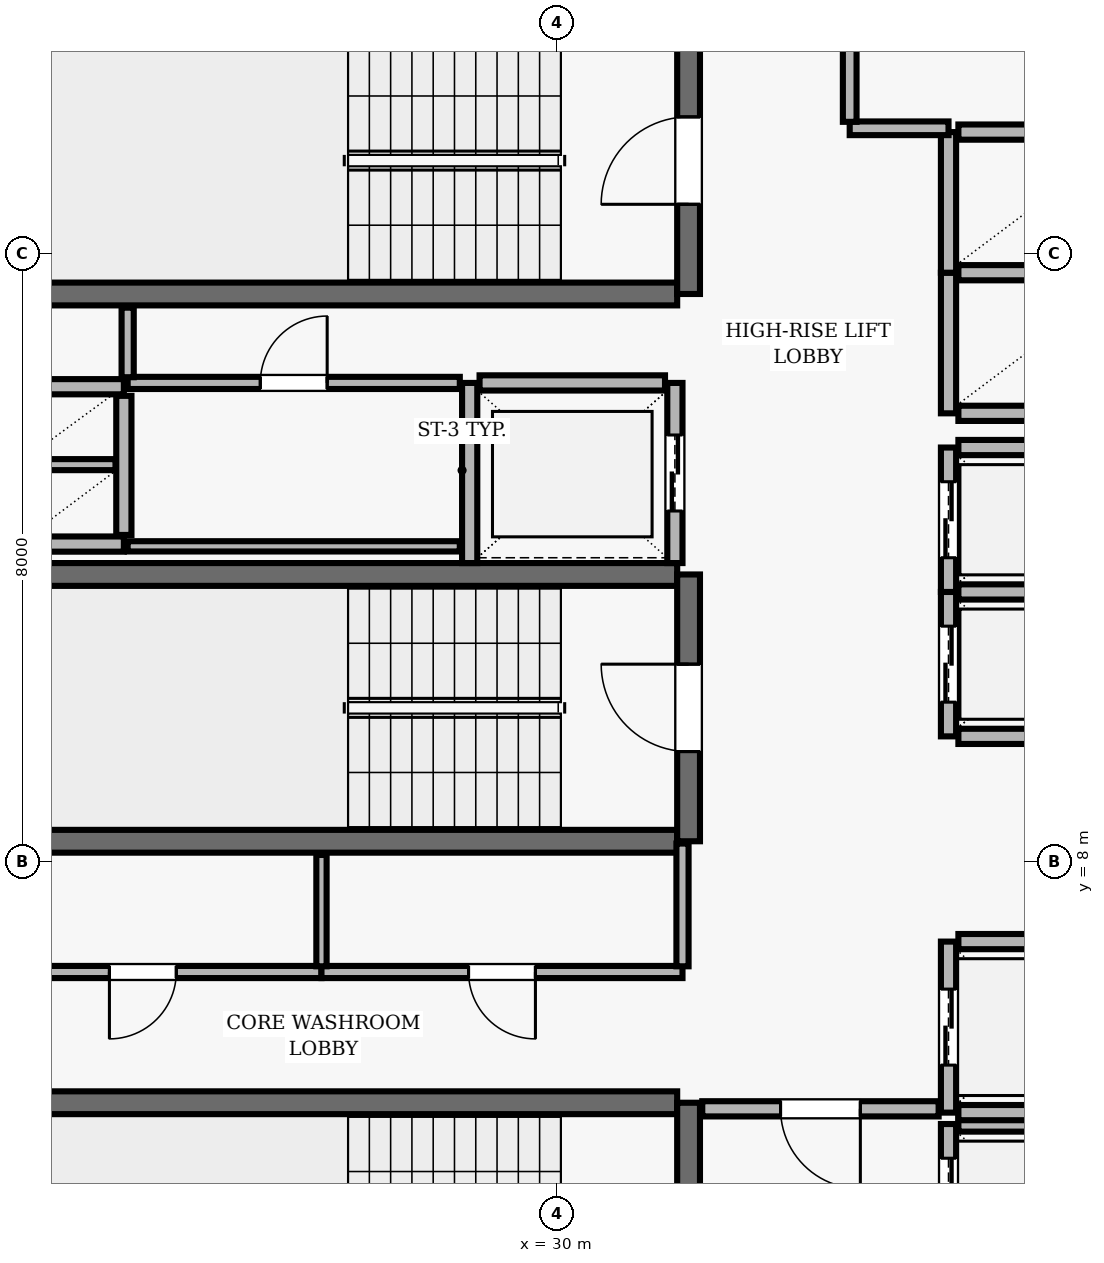
"""IFC4 building model, lengths in metres.
Left out: names, types, materials, properties, quantities, classifications, styles, units other than length and angle.
Written with IfcOpenShell. Run it as: python <this file> out.ifc"""

import sys

from ifc_helpers import new_model, si_unit, direction, frame, frame_2d, origin, place, context, subcontext, project, spatial, rectangle, extrude, element, fill, save


model = new_model("IFC4")
c1 = context("Model", 3, precision=1e-05, world=origin(), true_north=direction((0.0, 1.0)))
c2 = subcontext(c1, "Body", "Model", "MODEL_VIEW")
j1 = project(units=[si_unit("LENGTHUNIT", "METRE"), si_unit("PLANEANGLEUNIT", "RADIAN")], contexts=[c1])
p1 = place(None, origin())
s1 = spatial("IfcSite", under=j1, at=p1, CompositionType="ELEMENT")
p2 = place(p1, origin())
s2 = spatial("IfcBuilding", under=s1, at=p2, CompositionType="ELEMENT")
p3 = place(p2, frame((0.0, 0.0, 287.2)))
s3 = spatial("IfcBuildingStorey", under=s2, at=p3, CompositionType="ELEMENT", Elevation=287.2)
p4 = place(p3, frame((31.58, 4.83, 0.0), z_axis=(0.0, 0.0, 1.0), x_axis=(-1.0, 0.0, 0.0)))
e1 = element("IfcWall", 1, at=p4, inside=s3, PredefinedType="SHEAR", context=c2, shape_type="SweptSolid", body=[
    extrude(rectangle(XDim=8.36, YDim=0.3, at=frame_2d((4.18, 0.0))), origin(), (0.0, 0.0, 1.0), 3.69),
])
p5 = place(p3, frame((31.73, 0.96, 0.0), z_axis=(0.0, 0.0, 1.0), x_axis=(0.0, 1.0, 0.0)))
e2 = element("IfcWall", 2, at=p5, inside=s3, PredefinedType="SHEAR", context=c2, shape_type="SweptSolid", body=[
    extrude(rectangle(XDim=3.87, YDim=0.3, at=frame_2d((1.935, 0.0))), origin(), (0.0, 0.0, 1.0), 3.69),
])
p6 = place(p5, frame((1.54, 0.0, 0.0)))
e3 = element("IfcOpeningElement", 3, at=p6, cuts=e2, PredefinedType="OPENING", context=c2, shape_type="SweptSolid", body=[
    extrude(rectangle(XDim=1.15, YDim=2.15, at=frame_2d((0.575, 1.075))), frame((0.0, 0.16, 0.0), z_axis=(0.0, -1.0, 0.0), x_axis=(1.0, 0.0, 0.0)), (0.0, 0.0, 1.0), 0.32),
])
p7 = place(p3, frame((23.22, 15.47, 0.0), z_axis=(0.0, 0.0, 1.0), x_axis=(1.0, 0.0, 0.0)))
e4 = element("IfcWall", 4, at=p7, inside=s3, PredefinedType="SHEAR", context=c2, shape_type="SweptSolid", body=[
    extrude(rectangle(XDim=8.36, YDim=0.3, at=frame_2d((4.18, 0.0))), origin(), (0.0, 0.0, 1.0), 3.69),
])
p8 = place(p3, frame((31.73, 15.47, 0.0), z_axis=(0.0, 0.0, 1.0), x_axis=(0.0, 1.0, 0.0)))
e5 = element("IfcWall", 5, at=p8, inside=s3, PredefinedType="SHEAR", context=c2, shape_type="SweptSolid", body=[
    extrude(rectangle(XDim=3.51, YDim=0.3, at=frame_2d((1.755, 0.0))), origin(), (0.0, 0.0, 1.0), 3.69),
])
p9 = place(p8, frame((1.18, 0.0, 0.0)))
e6 = element("IfcOpeningElement", 6, at=p9, cuts=e5, PredefinedType="OPENING", context=c2, shape_type="SweptSolid", body=[
    extrude(rectangle(XDim=1.15, YDim=2.15, at=frame_2d((0.575, 1.075))), frame((0.0, 0.16, 0.0), z_axis=(0.0, -1.0, 0.0), x_axis=(1.0, 0.0, 0.0)), (0.0, 0.0, 1.0), 0.32),
])
for number, where, z_axis, x_axis in (
    (7, (31.58, 11.78, 0.0), (0.0, 0.0, 1.0), (-1.0, 0.0, 0.0)),
    (8, (23.22, 8.27, 0.0), (0.0, 0.0, 1.0), (1.0, 0.0, 0.0)),
):
    element("IfcWall", number, at=place(p3, frame(where, z_axis=z_axis, x_axis=x_axis)), inside=s3, PredefinedType="SHEAR", context=c2, shape_type="SweptSolid", body=[
        extrude(rectangle(XDim=8.36, YDim=0.3, at=frame_2d((4.18, 0.0))), origin(), (0.0, 0.0, 1.0), 3.69),
    ])
p10 = place(p3, frame((31.73, 8.27, 0.0), z_axis=(0.0, 0.0, 1.0), x_axis=(0.0, 1.0, 0.0)))
e9 = element("IfcWall", 9, at=p10, inside=s3, PredefinedType="SHEAR", context=c2, shape_type="SweptSolid", body=[
    extrude(rectangle(XDim=3.51, YDim=0.3, at=frame_2d((1.755, 0.0))), origin(), (0.0, 0.0, 1.0), 3.69),
])
p11 = place(p10, frame((1.18, 0.0, 0.0)))
e10 = element("IfcOpeningElement", 10, at=p11, cuts=e9, PredefinedType="OPENING", context=c2, shape_type="SweptSolid", body=[
    extrude(rectangle(XDim=1.15, YDim=2.15, at=frame_2d((0.575, 1.075))), frame((0.0, 0.16, 0.0), z_axis=(0.0, -1.0, 0.0), x_axis=(1.0, 0.0, 0.0)), (0.0, 0.0, 1.0), 0.32),
])
p12 = place(p3, frame((35.15, 4.55, 0.0), z_axis=(0.0, 0.0, 1.0), x_axis=(0.0, -1.0, 0.0)))
e11 = element("IfcWall", 11, at=p12, inside=s3, PredefinedType="SOLIDWALL", context=c2, shape_type="SweptSolid", body=[
    extrude(rectangle(XDim=2.1, YDim=0.2, at=frame_2d((1.05, 0.0))), origin(), (0.0, 0.0, 1.0), 3.69),
])
p13 = place(p12, frame((0.45, 0.0, 0.0)))
e12 = element("IfcOpeningElement", 12, at=p13, cuts=e11, PredefinedType="OPENING", context=c2, shape_type="SweptSolid", body=[
    extrude(rectangle(XDim=1.2, YDim=2.15, at=frame_2d((0.6, 1.075))), frame((0.0, 0.11, 0.0), z_axis=(0.0, -1.0, 0.0), x_axis=(1.0, 0.0, 0.0)), (0.0, 0.0, 1.0), 0.22),
])
p14 = place(p3, frame((37.42, 4.55, 0.0), z_axis=(0.0, 0.0, 1.0), x_axis=(-1.0, 0.0, 0.0)))
e13 = element("IfcWall", 13, at=p14, inside=s3, PredefinedType="SOLIDWALL", context=c2, shape_type="SweptSolid", body=[
    extrude(rectangle(XDim=2.14, YDim=0.2, at=frame_2d((1.07, 0.0))), origin(), (0.0, 0.0, 1.0), 3.69),
])
p15 = place(p3, frame((35.15, 6.95, 0.0), z_axis=(0.0, 0.0, 1.0), x_axis=(0.0, -1.0, 0.0)))
e14 = element("IfcWall", 14, at=p15, inside=s3, PredefinedType="SOLIDWALL", context=c2, shape_type="SweptSolid", body=[
    extrude(rectangle(XDim=2.25, YDim=0.2, at=frame_2d((1.125, 0.0))), origin(), (0.0, 0.0, 1.0), 3.69),
])
p16 = place(p15, frame((0.625, 0.0, 0.0)))
e15 = element("IfcOpeningElement", 15, at=p16, cuts=e14, PredefinedType="OPENING", context=c2, shape_type="SweptSolid", body=[
    extrude(rectangle(XDim=1.0, YDim=2.1, at=frame_2d((0.5, 1.05))), frame((0.0, 0.11, 0.0), z_axis=(0.0, -1.0, 0.0), x_axis=(1.0, 0.0, 0.0)), (0.0, 0.0, 1.0), 0.22),
])
for number, where, z_axis, x_axis in (
    (16, (35.28, 4.7, 0.0), (0.0, 0.0, 1.0), (1.0, 0.0, 0.0)),
    (17, (37.42, 6.95, 0.0), (0.0, 0.0, 1.0), (-1.0, 0.0, 0.0)),
):
    element("IfcWall", number, at=place(p3, frame(where, z_axis=z_axis, x_axis=x_axis)), inside=s3, PredefinedType="SOLIDWALL", context=c2, shape_type="SweptSolid", body=[
        extrude(rectangle(XDim=2.14, YDim=0.2, at=frame_2d((1.07, 0.0))), origin(), (0.0, 0.0, 1.0), 3.69),
    ])
p17 = place(p3, frame((35.15, 11.55, 0.0), z_axis=(0.0, 0.0, 1.0), x_axis=(0.0, -1.0, 0.0)))
e18 = element("IfcWall", 18, at=p17, inside=s3, PredefinedType="SOLIDWALL", context=c2, shape_type="SweptSolid", body=[
    extrude(rectangle(XDim=1.9, YDim=0.2, at=frame_2d((0.95, 0.0))), origin(), (0.0, 0.0, 1.0), 3.69),
])
p18 = place(p17, frame((0.45, 0.0, 0.0)))
e19 = element("IfcOpeningElement", 19, at=p18, cuts=e18, PredefinedType="OPENING", context=c2, shape_type="SweptSolid", body=[
    extrude(rectangle(XDim=1.0, YDim=2.1, at=frame_2d((0.5, 1.05))), frame((0.0, 0.11, 0.0), z_axis=(0.0, -1.0, 0.0), x_axis=(1.0, 0.0, 0.0)), (0.0, 0.0, 1.0), 0.22),
])
for number, where, z_axis, x_axis in (
    (20, (35.28, 9.65, 0.0), (0.0, 0.0, 1.0), (1.0, 0.0, 0.0)),
    (21, (37.42, 11.55, 0.0), (0.0, 0.0, 1.0), (-1.0, 0.0, 0.0)),
):
    element("IfcWall", number, at=place(p3, frame(where, z_axis=z_axis, x_axis=x_axis)), inside=s3, PredefinedType="SOLIDWALL", context=c2, shape_type="SweptSolid", body=[
        extrude(rectangle(XDim=2.14, YDim=0.2, at=frame_2d((1.07, 0.0))), origin(), (0.0, 0.0, 1.0), 3.69),
    ])
p19 = place(p3, frame((35.15, 13.45, 0.0), z_axis=(0.0, 0.0, 1.0), x_axis=(0.0, -1.0, 0.0)))
e22 = element("IfcWall", 22, at=p19, inside=s3, PredefinedType="SOLIDWALL", context=c2, shape_type="SweptSolid", body=[
    extrude(rectangle(XDim=1.9, YDim=0.2, at=frame_2d((0.95, 0.0))), origin(), (0.0, 0.0, 1.0), 3.69),
])
p20 = place(p19, frame((0.45, 0.0, 0.0)))
e23 = element("IfcOpeningElement", 23, at=p20, cuts=e22, PredefinedType="OPENING", context=c2, shape_type="SweptSolid", body=[
    extrude(rectangle(XDim=1.0, YDim=2.1, at=frame_2d((0.5, 1.05))), frame((0.0, 0.11, 0.0), z_axis=(0.0, -1.0, 0.0), x_axis=(1.0, 0.0, 0.0)), (0.0, 0.0, 1.0), 0.22),
])
p21 = place(p3, frame((37.42, 13.45, 0.0), z_axis=(0.0, 0.0, 1.0), x_axis=(-1.0, 0.0, 0.0)))
e24 = element("IfcWall", 24, at=p21, inside=s3, PredefinedType="SOLIDWALL", context=c2, shape_type="SweptSolid", body=[
    extrude(rectangle(XDim=2.14, YDim=0.2, at=frame_2d((1.07, 0.0))), origin(), (0.0, 0.0, 1.0), 3.69),
])
p22 = place(p3, frame((28.85, 14.3, 0.0), z_axis=(0.0, 0.0, 1.0), x_axis=(0.0, -1.0, 0.0)))
e25 = element("IfcWall", 25, at=p22, inside=s3, PredefinedType="SOLIDWALL", context=c2, shape_type="SweptSolid", body=[
    extrude(rectangle(XDim=2.37, YDim=0.2, at=frame_2d((1.185, 0.0))), origin(), (0.0, 0.0, 1.0), 3.69),
])
p23 = place(p3, frame((31.55, 11.93, 0.0), z_axis=(0.0, 0.0, 1.0), x_axis=(0.0, 1.0, 0.0)))
e26 = element("IfcWall", 26, at=p23, inside=s3, PredefinedType="SOLIDWALL", context=c2, shape_type="SweptSolid", body=[
    extrude(rectangle(XDim=2.37, YDim=0.2, at=frame_2d((1.185, 0.0))), origin(), (0.0, 0.0, 1.0), 3.69),
])
p24 = place(p23, frame((0.685, 0.0, 0.0)))
e27 = element("IfcOpeningElement", 27, at=p24, cuts=e26, PredefinedType="OPENING", context=c2, shape_type="SweptSolid", body=[
    extrude(rectangle(XDim=1.0, YDim=2.1, at=frame_2d((0.5, 1.05))), frame((0.0, 0.11, 0.0), z_axis=(0.0, -1.0, 0.0), x_axis=(1.0, 0.0, 0.0)), (0.0, 0.0, 1.0), 0.22),
])
p25 = place(p3, frame((31.42, 14.3, 0.0), z_axis=(0.0, 0.0, 1.0), x_axis=(-1.0, 0.0, 0.0)))
e28 = element("IfcWall", 28, at=p25, inside=s3, PredefinedType="SOLIDWALL", context=c2, shape_type="SweptSolid", body=[
    extrude(rectangle(XDim=2.44, YDim=0.2, at=frame_2d((1.22, 0.0))), origin(), (0.0, 0.0, 1.0), 3.69),
])
p26 = place(p3, frame((35.15, 15.75, 0.0), z_axis=(0.0, 0.0, 1.0), x_axis=(0.0, -1.0, 0.0)))
e29 = element("IfcWall", 29, at=p26, inside=s3, PredefinedType="SOLIDWALL", context=c2, shape_type="SweptSolid", body=[
    extrude(rectangle(XDim=1.85, YDim=0.2, at=frame_2d((0.925, 0.0))), origin(), (0.0, 0.0, 1.0), 3.69),
])
for number, where, z_axis, x_axis in (
    (30, (35.28, 13.9, 0.0), (0.0, 0.0, 1.0), (1.0, 0.0, 0.0)),
    (31, (37.42, 15.75, 0.0), (0.0, 0.0, 1.0), (-1.0, 0.0, 0.0)),
):
    element("IfcWall", number, at=place(p3, frame(where, z_axis=z_axis, x_axis=x_axis)), inside=s3, PredefinedType="SOLIDWALL", context=c2, shape_type="SweptSolid", body=[
        extrude(rectangle(XDim=2.14, YDim=0.2, at=frame_2d((1.07, 0.0))), origin(), (0.0, 0.0, 1.0), 3.69),
    ])
p27 = place(p3, frame((35.15, 17.6, 0.0), z_axis=(0.0, 0.0, 1.0), x_axis=(0.0, -1.0, 0.0)))
e32 = element("IfcWall", 32, at=p27, inside=s3, PredefinedType="SOLIDWALL", context=c2, shape_type="SweptSolid", body=[
    extrude(rectangle(XDim=1.85, YDim=0.2, at=frame_2d((0.925, 0.0))), origin(), (0.0, 0.0, 1.0), 3.69),
])
p28 = place(p3, frame((37.42, 17.6, 0.0), z_axis=(0.0, 0.0, 1.0), x_axis=(-1.0, 0.0, 0.0)))
e33 = element("IfcWall", 33, at=p28, inside=s3, PredefinedType="SOLIDWALL", context=c2, shape_type="SweptSolid", body=[
    extrude(rectangle(XDim=2.14, YDim=0.2, at=frame_2d((1.07, 0.0))), origin(), (0.0, 0.0, 1.0), 3.69),
])
for number, where, z_axis, x_axis in (
    (34, (22.9, 14.25, 0.0), (0.0, 0.0, 1.0), (1.0, 0.0, 0.0)),
    (35, (22.9, 12.18, 0.0), (0.0, 0.0, 1.0), (1.0, 0.0, 0.0)),
):
    element("IfcWall", number, at=place(p3, frame(where, z_axis=z_axis, x_axis=x_axis)), inside=s3, PredefinedType="SOLIDWALL", context=c2, shape_type="SweptSolid", body=[
        extrude(rectangle(XDim=1.4, YDim=0.2, at=frame_2d((0.7, 0.0))), origin(), (0.0, 0.0, 1.0), 3.69),
    ])
p29 = place(p3, frame((24.3, 12.3, 0.0), z_axis=(0.0, 0.0, 1.0), x_axis=(0.0, 1.0, 0.0)))
e36 = element("IfcWall", 36, at=p29, inside=s3, PredefinedType="SOLIDWALL", context=c2, shape_type="SweptSolid", body=[
    extrude(rectangle(XDim=1.83, YDim=0.2, at=frame_2d((0.915, 0.0))), origin(), (0.0, 0.0, 1.0), 3.69),
])
p30 = place(p3, frame((23.01, 13.225, 0.0), z_axis=(0.0, 0.0, 1.0), x_axis=(1.0, 0.0, 0.0)))
e37 = element("IfcWall", 37, at=p30, inside=s3, PredefinedType="PARTITIONING", context=c2, shape_type="SweptSolid", body=[
    extrude(rectangle(XDim=1.18, YDim=0.145, at=frame_2d((0.59, 0.0))), origin(), (0.0, 0.0, 1.0), 3.69),
])
p31 = place(p3, frame((24.35, 12.15, 0.0), z_axis=(0.0, 0.0, 1.0), x_axis=(1.0, 0.0, 0.0)))
e38 = element("IfcWall", 38, at=p31, inside=s3, PredefinedType="PARTITIONING", context=c2, shape_type="SweptSolid", body=[
    extrude(rectangle(XDim=4.37, YDim=0.135, at=frame_2d((2.185, 0.0))), origin(), (0.0, 0.0, 1.0), 3.69),
])
p32 = place(p3, frame((24.35, 14.3, 0.0), z_axis=(0.0, 0.0, 1.0), x_axis=(1.0, 0.0, 0.0)))
e39 = element("IfcWall", 39, at=p32, inside=s3, PredefinedType="PARTITIONING", context=c2, shape_type="SweptSolid", body=[
    extrude(rectangle(XDim=4.37, YDim=0.16, at=frame_2d((2.185, 0.0))), origin(), (0.0, 0.0, 1.0), 3.69),
])
p33 = place(p32, frame((1.745, 0.0, 0.0)))
e40 = element("IfcOpeningElement", 40, at=p33, cuts=e39, PredefinedType="OPENING", context=c2, shape_type="SweptSolid", body=[
    extrude(rectangle(XDim=0.88, YDim=2.1, at=frame_2d((0.44, 1.05))), frame((0.0, 0.09, 0.0), z_axis=(0.0, -1.0, 0.0), x_axis=(1.0, 0.0, 0.0)), (0.0, 0.0, 1.0), 0.18),
])
p34 = place(p3, frame((26.9, 6.55, 0.0), z_axis=(0.0, 0.0, 1.0), x_axis=(-1.0, 0.0, 0.0)))
e41 = element("IfcWall", 41, at=p34, inside=s3, PredefinedType="PARTITIONING", context=c2, shape_type="SweptSolid", body=[
    extrude(rectangle(XDim=4.7, YDim=0.16, at=frame_2d((2.35, 0.0))), origin(), (0.0, 0.0, 1.0), 3.69),
])
p35 = place(p34, frame((1.91, 0.0, 0.0)))
e42 = element("IfcOpeningElement", 42, at=p35, cuts=e41, PredefinedType="OPENING", context=c2, shape_type="SweptSolid", body=[
    extrude(rectangle(XDim=0.88, YDim=2.1, at=frame_2d((0.44, 1.05))), frame((0.0, 0.09, 0.0), z_axis=(0.0, -1.0, 0.0), x_axis=(1.0, 0.0, 0.0)), (0.0, 0.0, 1.0), 0.18),
])
p36 = place(p3, frame((31.65, 6.55, 0.0), z_axis=(0.0, 0.0, 1.0), x_axis=(-1.0, 0.0, 0.0)))
e43 = element("IfcWall", 43, at=p36, inside=s3, PredefinedType="PARTITIONING", context=c2, shape_type="SweptSolid", body=[
    extrude(rectangle(XDim=4.75, YDim=0.16, at=frame_2d((2.375, 0.0))), origin(), (0.0, 0.0, 1.0), 3.69),
])
p37 = place(p36, frame((1.935, 0.0, 0.0)))
e44 = element("IfcOpeningElement", 44, at=p37, cuts=e43, PredefinedType="OPENING", context=c2, shape_type="SweptSolid", body=[
    extrude(rectangle(XDim=0.88, YDim=2.1, at=frame_2d((0.44, 1.05))), frame((0.0, 0.09, 0.0), z_axis=(0.0, -1.0, 0.0), x_axis=(1.0, 0.0, 0.0)), (0.0, 0.0, 1.0), 0.18),
])
p38 = place(p3, frame((33.85, 17.65, 0.0), z_axis=(0.0, 0.0, 1.0), x_axis=(1.0, 0.0, 0.0)))
e45 = element("IfcWall", 45, at=p38, inside=s3, PredefinedType="PARTITIONING", context=c2, shape_type="SweptSolid", body=[
    extrude(rectangle(XDim=1.3, YDim=0.18, at=frame_2d((0.65, 0.0))), origin(), (0.0, 0.0, 1.0), 3.69),
])
p39 = place(p3, frame((35.02, 4.75, 0.0), z_axis=(0.0, 0.0, 1.0), x_axis=(-1.0, 0.0, 0.0)))
e46 = element("IfcWall", 46, at=p39, inside=s3, PredefinedType="SOLIDWALL", context=c2, shape_type="SweptSolid", body=[
    extrude(rectangle(XDim=3.11, YDim=0.2, at=frame_2d((1.555, 0.0))), origin(), (0.0, 0.0, 1.0), 3.69),
])
p40 = place(p39, frame((1.03, 0.0, 0.0)))
e47 = element("IfcOpeningElement", 47, at=p40, cuts=e46, PredefinedType="OPENING", context=c2, shape_type="SweptSolid", body=[
    extrude(rectangle(XDim=1.05, YDim=2.15, at=frame_2d((0.525, 1.075))), frame((0.0, 0.11, 0.0), z_axis=(0.0, -1.0, 0.0), x_axis=(1.0, 0.0, 0.0)), (0.0, 0.0, 1.0), 0.22),
])
p41 = place(p3, frame((24.35, 15.29, 0.0), z_axis=(0.0, 0.0, 1.0), x_axis=(0.0, -1.0, 0.0)))
e48 = element("IfcWall", 48, at=p41, inside=s3, PredefinedType="PARTITIONING", context=c2, shape_type="SweptSolid", body=[
    extrude(rectangle(XDim=0.915, YDim=0.16, at=frame_2d((0.458, 0.0))), origin(), (0.0, 0.0, 1.0), 3.69),
])
p42 = place(p3, frame((26.9, 6.625, 0.0), z_axis=(0.0, 0.0, 1.0), x_axis=(0.0, 1.0, 0.0)))
e49 = element("IfcWall", 49, at=p42, inside=s3, PredefinedType="PARTITIONING", context=c2, shape_type="SweptSolid", body=[
    extrude(rectangle(XDim=1.465, YDim=0.135, at=frame_2d((0.732, 0.0))), origin(), (0.0, 0.0, 1.0), 3.69),
])
p43 = place(p3, frame((31.65, 8.24, 0.0), z_axis=(0.0, 0.0, 1.0), x_axis=(0.0, -1.0, 0.0)))
e50 = element("IfcWall", 50, at=p43, inside=s3, PredefinedType="PARTITIONING", context=c2, shape_type="SweptSolid", body=[
    extrude(rectangle(XDim=1.615, YDim=0.16, at=frame_2d((0.808, 0.0))), origin(), (0.0, 0.0, 1.0), 3.69),
])
p44 = place(p3, frame((33.85, 17.735, 0.0), z_axis=(0.0, 0.0, 1.0), x_axis=(0.0, 1.0, 0.0)))
e51 = element("IfcWall", 51, at=p44, inside=s3, PredefinedType="PARTITIONING", context=c2, shape_type="SweptSolid", body=[
    extrude(rectangle(XDim=2.93, YDim=0.18, at=frame_2d((1.465, 0.0))), origin(), (0.0, 0.0, 1.0), 3.69),
])
p45 = place(p44, frame((0.99, 0.0, 0.0)))
e52 = element("IfcOpeningElement", 52, at=p45, cuts=e51, PredefinedType="OPENING", context=c2, shape_type="SweptSolid", body=[
    extrude(rectangle(XDim=0.95, YDim=2.1, at=frame_2d((0.475, 1.05))), frame((0.0, 0.1, 0.0), z_axis=(0.0, -1.0, 0.0), x_axis=(1.0, 0.0, 0.0)), (0.0, 0.0, 1.0), 0.2),
])
p46 = place(p9, origin())
e53 = element("IfcDoor", 53, at=p46, inside=s3, OperationType="SINGLE_SWING_LEFT", PredefinedType="DOOR", context=c2, shape_type="SweptSolid", body=[
    extrude(rectangle(XDim=1.15, YDim=2.15, at=frame_2d((0.575, 1.075))), frame((0.0, 0.025, 0.0), z_axis=(0.0, -1.0, 0.0), x_axis=(1.0, 0.0, 0.0)), (0.0, 0.0, 1.0), 0.05),
])
fill(e6, e53)
p47 = place(p11, origin())
e54 = element("IfcDoor", 54, at=p47, inside=s3, OperationType="SINGLE_SWING_RIGHT", PredefinedType="DOOR", context=c2, shape_type="SweptSolid", body=[
    extrude(rectangle(XDim=1.15, YDim=2.15, at=frame_2d((0.575, 1.075))), frame((0.0, 0.025, 0.0), z_axis=(0.0, -1.0, 0.0), x_axis=(1.0, 0.0, 0.0)), (0.0, 0.0, 1.0), 0.05),
])
fill(e10, e54)
p48 = place(p13, origin())
e55 = element("IfcDoor", 55, at=p48, inside=s3, OperationType="DOUBLE_DOOR_SLIDING", PredefinedType="DOOR", context=c2, shape_type="SweptSolid", body=[
    extrude(rectangle(XDim=1.2, YDim=2.15, at=frame_2d((0.6, 1.075))), frame((0.0, 0.025, 0.0), z_axis=(0.0, -1.0, 0.0), x_axis=(1.0, 0.0, 0.0)), (0.0, 0.0, 1.0), 0.05),
])
fill(e12, e55)
p49 = place(p16, origin())
e56 = element("IfcDoor", 56, at=p49, inside=s3, OperationType="DOUBLE_DOOR_SLIDING", PredefinedType="DOOR", context=c2, shape_type="SweptSolid", body=[
    extrude(rectangle(XDim=1.0, YDim=2.1, at=frame_2d((0.5, 1.05))), frame((0.0, 0.025, 0.0), z_axis=(0.0, -1.0, 0.0), x_axis=(1.0, 0.0, 0.0)), (0.0, 0.0, 1.0), 0.05),
])
fill(e15, e56)
p50 = place(p18, origin())
e57 = element("IfcDoor", 57, at=p50, inside=s3, OperationType="DOUBLE_DOOR_SLIDING", PredefinedType="DOOR", context=c2, shape_type="SweptSolid", body=[
    extrude(rectangle(XDim=1.0, YDim=2.1, at=frame_2d((0.5, 1.05))), frame((0.0, 0.025, 0.0), z_axis=(0.0, -1.0, 0.0), x_axis=(1.0, 0.0, 0.0)), (0.0, 0.0, 1.0), 0.05),
])
fill(e19, e57)
p51 = place(p20, origin())
e58 = element("IfcDoor", 58, at=p51, inside=s3, OperationType="DOUBLE_DOOR_SLIDING", PredefinedType="DOOR", context=c2, shape_type="SweptSolid", body=[
    extrude(rectangle(XDim=1.0, YDim=2.1, at=frame_2d((0.5, 1.05))), frame((0.0, 0.025, 0.0), z_axis=(0.0, -1.0, 0.0), x_axis=(1.0, 0.0, 0.0)), (0.0, 0.0, 1.0), 0.05),
])
fill(e23, e58)
p52 = place(p24, origin())
e59 = element("IfcDoor", 59, at=p52, inside=s3, OperationType="DOUBLE_DOOR_SLIDING", PredefinedType="DOOR", context=c2, shape_type="SweptSolid", body=[
    extrude(rectangle(XDim=1.0, YDim=2.1, at=frame_2d((0.5, 1.05))), frame((0.0, 0.025, 0.0), z_axis=(0.0, -1.0, 0.0), x_axis=(1.0, 0.0, 0.0)), (0.0, 0.0, 1.0), 0.05),
])
fill(e27, e59)
p53 = place(p40, origin())
e60 = element("IfcDoor", 60, at=p53, inside=s3, OperationType="SINGLE_SWING_LEFT", PredefinedType="DOOR", context=c2, shape_type="SweptSolid", body=[
    extrude(rectangle(XDim=1.05, YDim=2.15, at=frame_2d((0.525, 1.075))), frame((0.0, 0.025, 0.0), z_axis=(0.0, -1.0, 0.0), x_axis=(1.0, 0.0, 0.0)), (0.0, 0.0, 1.0), 0.05),
])
fill(e47, e60)
p54 = place(p35, origin())
e61 = element("IfcDoor", 61, at=p54, inside=s3, OperationType="SINGLE_SWING_RIGHT", PredefinedType="DOOR", context=c2, shape_type="SweptSolid", body=[
    extrude(rectangle(XDim=0.88, YDim=2.1, at=frame_2d((0.44, 1.05))), frame((0.0, 0.025, 0.0), z_axis=(0.0, -1.0, 0.0), x_axis=(1.0, 0.0, 0.0)), (0.0, 0.0, 1.0), 0.05),
])
fill(e42, e61)
p55 = place(p37, origin())
e62 = element("IfcDoor", 62, at=p55, inside=s3, OperationType="SINGLE_SWING_LEFT", PredefinedType="DOOR", context=c2, shape_type="SweptSolid", body=[
    extrude(rectangle(XDim=0.88, YDim=2.1, at=frame_2d((0.44, 1.05))), frame((0.0, 0.025, 0.0), z_axis=(0.0, -1.0, 0.0), x_axis=(1.0, 0.0, 0.0)), (0.0, 0.0, 1.0), 0.05),
])
fill(e44, e62)
p56 = place(p33, origin())
e63 = element("IfcDoor", 63, at=p56, inside=s3, OperationType="SINGLE_SWING_RIGHT", PredefinedType="DOOR", context=c2, shape_type="SweptSolid", body=[
    extrude(rectangle(XDim=0.88, YDim=2.1, at=frame_2d((0.44, 1.05))), frame((0.0, 0.025, 0.0), z_axis=(0.0, -1.0, 0.0), x_axis=(1.0, 0.0, 0.0)), (0.0, 0.0, 1.0), 0.05),
])
fill(e40, e63)
save(model, sys.argv[1])
